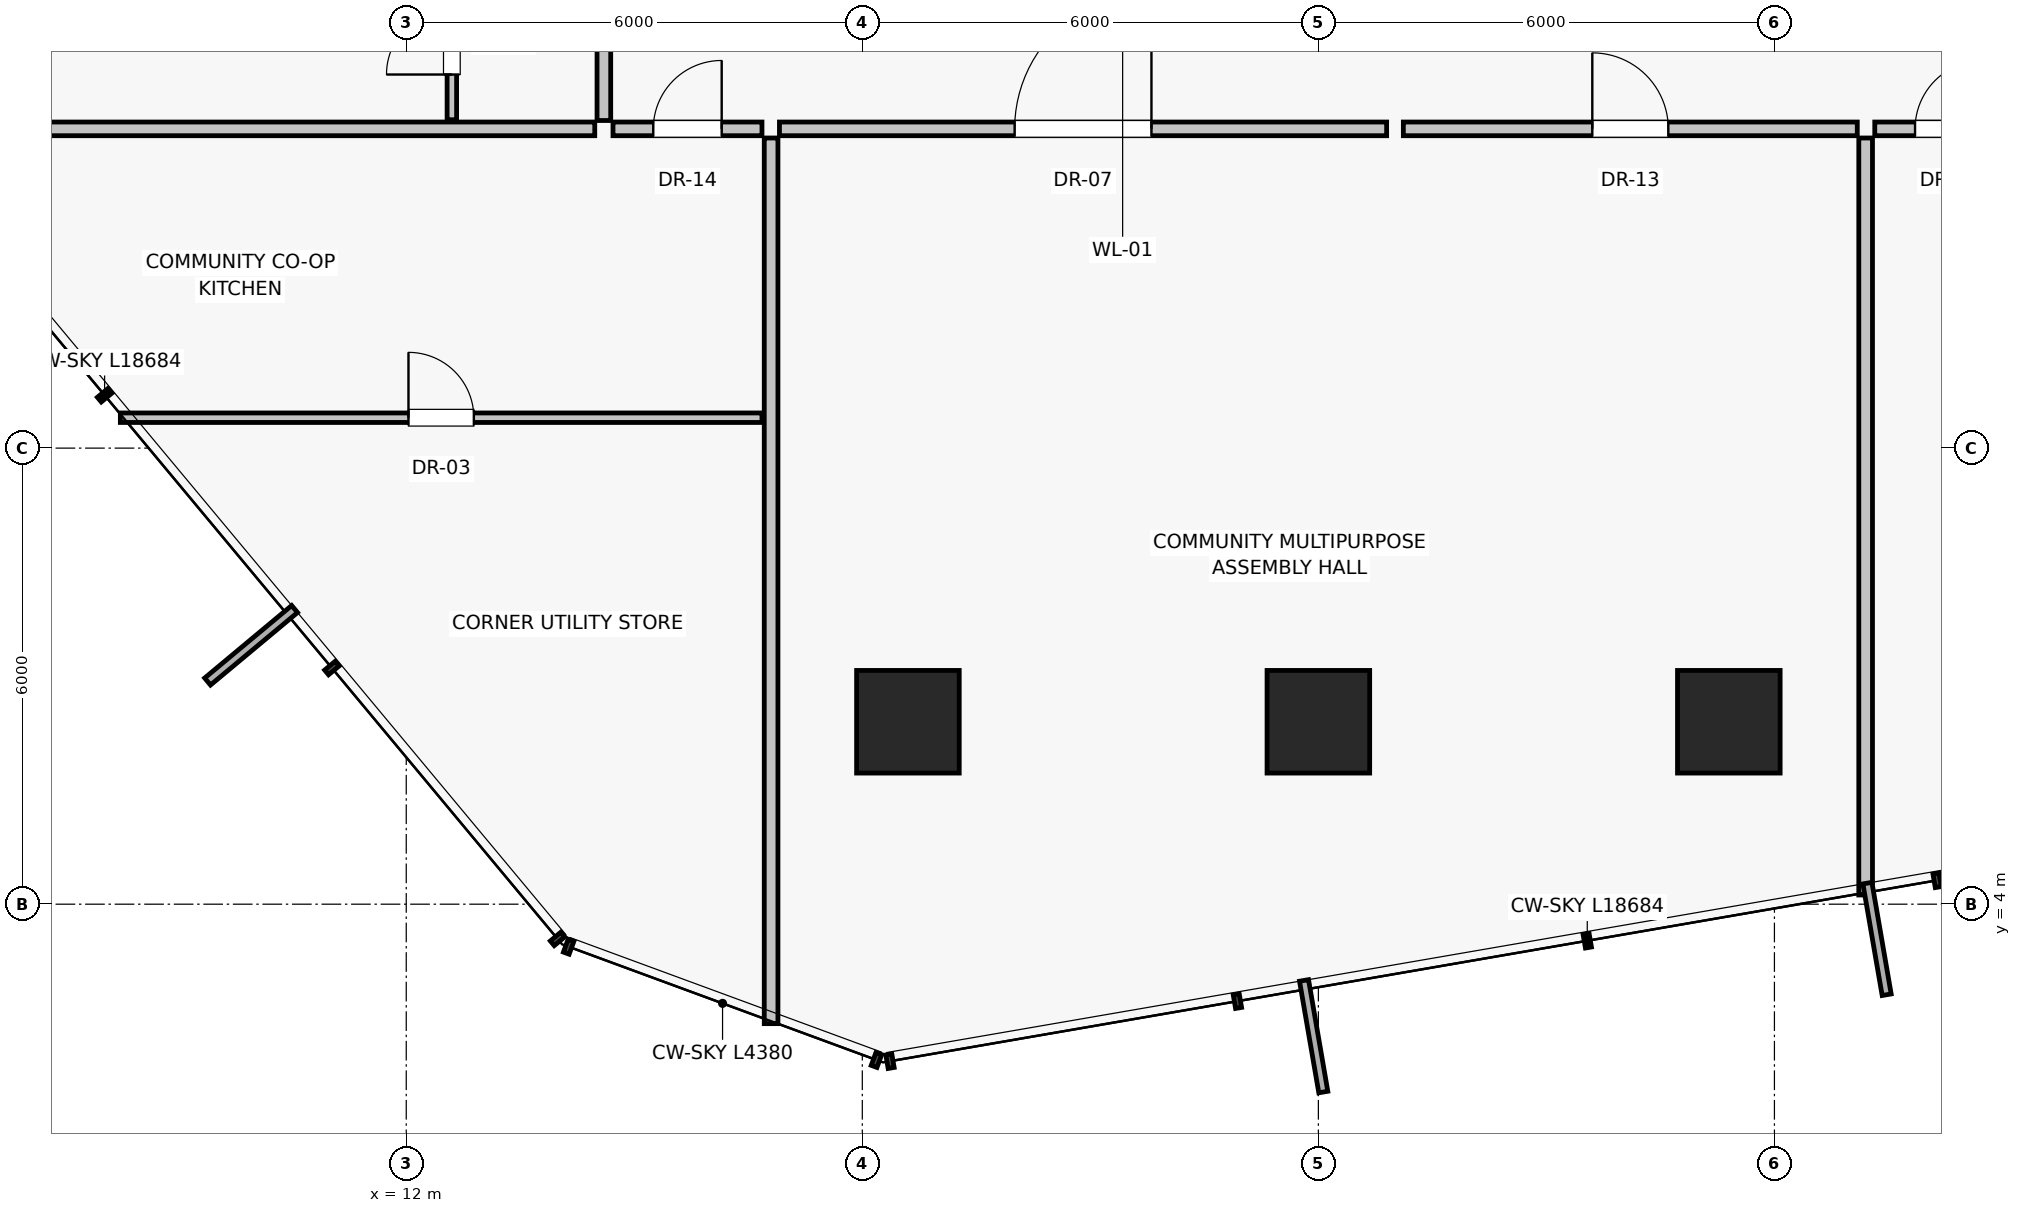
"""IFC4 building model, lengths in metres.
Left out: names, types, materials, properties, quantities, classifications, styles, units other than length and angle.
Written with IfcOpenShell. Run it as: python <this file> out.ifc"""

import sys

from ifc_helpers import new_model, si_unit, direction, frame, frame_2d, origin, origin_2d, place, context, subcontext, project, spatial, rectangle, extrude, source, transform, mapped, element, fill, save


model = new_model("IFC4")
c1 = context("Model", 3, precision=1e-05, world=origin(), true_north=direction((0.0, 1.0)))
c2 = subcontext(c1, "Body", "Model", "MODEL_VIEW")
j1 = project(units=[si_unit("LENGTHUNIT", "METRE"), si_unit("PLANEANGLEUNIT", "RADIAN")], contexts=[c1])
p1 = place(None, origin())
s1 = spatial("IfcSite", under=j1, at=p1, CompositionType="ELEMENT")
p2 = place(p1, origin())
s2 = spatial("IfcBuilding", under=s1, at=p2, CompositionType="ELEMENT")
p3 = place(p2, frame((0.0, 0.0, 56.55)))
s3 = spatial("IfcBuildingStorey", under=s2, at=p3, CompositionType="ELEMENT", Elevation=56.55)
for number, where, z_axis, x_axis in (
    (1, (18.6, 6.4, 0.0), (0.0, 0.0, 1.0), (1.0, 0.0, 0.0)),
    (2, (24.0, 6.4, 0.0), (0.0, 0.0, 1.0), (1.0, 0.0, 0.0)),
    (3, (29.4, 6.4, 0.0), (0.0, 0.0, 1.0), (1.0, 0.0, 0.0)),
):
    element("IfcColumn", number, at=place(p3, frame(where, z_axis=z_axis, x_axis=x_axis)), inside=s3, PredefinedType="COLUMN", context=c2, shape_type="SweptSolid", body=[
        extrude(rectangle(XDim=1.35, YDim=1.35, at=origin_2d()), origin(), (0.0, 0.0, 1.0), 4.3),
    ])
p4 = place(p3, frame((16.8, 14.08, 0.0), z_axis=(0.0, 0.0, 1.0), x_axis=(0.0, -1.0, 0.0)))
e4 = element("IfcWall", 4, at=p4, inside=s3, PredefinedType="PARTITIONING", context=c2, shape_type="SweptSolid", body=[
    extrude(rectangle(XDim=11.652, YDim=0.18, at=frame_2d((5.826, 0.0))), origin(), (0.0, 0.0, 1.0), 4.05),
])
p5 = place(p3, frame((31.2, 14.08, 0.0), z_axis=(0.0, 0.0, 1.0), x_axis=(0.0, -1.0, 0.0)))
e5 = element("IfcWall", 5, at=p5, inside=s3, PredefinedType="PARTITIONING", context=c2, shape_type="SweptSolid", body=[
    extrude(rectangle(XDim=9.959, YDim=0.18, at=frame_2d((4.979, 0.0))), origin(), (0.0, 0.0, 1.0), 4.05),
])
p6 = place(p3, frame((16.91, 14.2, 0.0), z_axis=(0.0, 0.0, 1.0), x_axis=(1.0, 0.0, 0.0)))
e6 = element("IfcWall", 6, at=p6, inside=s3, PredefinedType="PARTITIONING", context=c2, shape_type="SweptSolid", body=[
    extrude(rectangle(XDim=7.988, YDim=0.18, at=frame_2d((3.994, 0.0))), origin(), (0.0, 0.0, 1.0), 4.05),
])
p7 = place(p6, frame((3.094, 0.0, 0.0)))
e7 = element("IfcOpeningElement", 7, at=p7, cuts=e6, PredefinedType="OPENING", context=c2, shape_type="SweptSolid", body=[
    extrude(rectangle(XDim=1.8, YDim=2.25, at=frame_2d((0.9, 1.125))), frame((0.0, 0.1, 0.0), z_axis=(0.0, -1.0, 0.0), x_axis=(1.0, 0.0, 0.0)), (0.0, 0.0, 1.0), 0.2),
])
p8 = place(p3, frame((25.118, 14.2, 0.0), z_axis=(0.0, 0.0, 1.0), x_axis=(1.0, 0.0, 0.0)))
e8 = element("IfcWall", 8, at=p8, inside=s3, PredefinedType="PARTITIONING", context=c2, shape_type="SweptSolid", body=[
    extrude(rectangle(XDim=5.972, YDim=0.18, at=frame_2d((2.986, 0.0))), origin(), (0.0, 0.0, 1.0), 4.05),
])
p9 = place(p8, frame((2.486, 0.0, 0.0)))
e9 = element("IfcOpeningElement", 9, at=p9, cuts=e8, PredefinedType="OPENING", context=c2, shape_type="SweptSolid", body=[
    extrude(rectangle(XDim=1.0, YDim=2.01, at=frame_2d((0.5, 1.005))), frame((0.0, 0.1, 0.0), z_axis=(0.0, -1.0, 0.0), x_axis=(1.0, 0.0, 0.0)), (0.0, 0.0, 1.0), 0.2),
])
p10 = place(p3, frame((14.48, 14.2, 0.0), z_axis=(0.0, 0.0, 1.0), x_axis=(-1.0, 0.0, 0.0)))
e10 = element("IfcWall", 10, at=p10, inside=s3, PredefinedType="PARTITIONING", context=c2, shape_type="SweptSolid", body=[
    extrude(rectangle(XDim=9.407, YDim=0.18, at=frame_2d((4.704, 0.0))), origin(), (0.0, 0.0, 1.0), 4.05),
])
p11 = place(p3, frame((14.6, 14.31, 0.0), z_axis=(0.0, 0.0, 1.0), x_axis=(0.0, 1.0, 0.0)))
e11 = element("IfcWall", 11, at=p11, inside=s3, PredefinedType="PARTITIONING", context=c2, shape_type="SweptSolid", body=[
    extrude(rectangle(XDim=11.032, YDim=0.18, at=frame_2d((5.516, 0.0))), origin(), (0.0, 0.0, 1.0), 4.05),
])
p12 = place(p11, frame((3.635, 0.0, 0.0)))
e12 = element("IfcOpeningElement", 12, at=p12, cuts=e11, PredefinedType="OPENING", context=c2, shape_type="SweptSolid", body=[
    extrude(rectangle(XDim=0.95, YDim=2.02, at=frame_2d((0.475, 1.01))), frame((0.0, 0.1, 0.0), z_axis=(0.0, -1.0, 0.0), x_axis=(1.0, 0.0, 0.0)), (0.0, 0.0, 1.0), 0.2),
])
p13 = place(p3, frame((12.6, 14.32, 0.0), z_axis=(0.0, 0.0, 1.0), x_axis=(0.0, 1.0, 0.0)))
e13 = element("IfcWall", 13, at=p13, inside=s3, PredefinedType="PARTITIONING", context=c2, shape_type="SweptSolid", body=[
    extrude(rectangle(XDim=2.05, YDim=0.125, at=frame_2d((1.025, 0.0))), origin(), (0.0, 0.0, 1.0), 4.05),
])
p14 = place(p13, frame((0.595, 0.0, 0.0)))
e14 = element("IfcOpeningElement", 14, at=p14, cuts=e13, PredefinedType="OPENING", context=c2, shape_type="SweptSolid", body=[
    extrude(rectangle(XDim=0.86, YDim=2.01, at=frame_2d((0.43, 1.005))), frame((0.0, 0.073, 0.0), z_axis=(0.0, -1.0, 0.0), x_axis=(1.0, 0.0, 0.0)), (0.0, 0.0, 1.0), 0.145),
])
p15 = place(p3, frame((14.72, 14.2, 0.0), z_axis=(0.0, 0.0, 1.0), x_axis=(1.0, 0.0, 0.0)))
e15 = element("IfcWall", 15, at=p15, inside=s3, PredefinedType="PARTITIONING", context=c2, shape_type="SweptSolid", body=[
    extrude(rectangle(XDim=1.96, YDim=0.18, at=frame_2d((0.98, 0.0))), origin(), (0.0, 0.0, 1.0), 4.05),
])
p16 = place(p15, frame((0.53, 0.0, 0.0)))
e16 = element("IfcOpeningElement", 16, at=p16, cuts=e15, PredefinedType="OPENING", context=c2, shape_type="SweptSolid", body=[
    extrude(rectangle(XDim=0.9, YDim=2.01, at=frame_2d((0.45, 1.005))), frame((0.0, 0.1, 0.0), z_axis=(0.0, -1.0, 0.0), x_axis=(1.0, 0.0, 0.0)), (0.0, 0.0, 1.0), 0.2),
])
p17 = place(p3, frame((8.239, 10.4, 0.0), z_axis=(0.0, 0.0, 1.0), x_axis=(1.0, 0.0, 0.0)))
e17 = element("IfcWall", 17, at=p17, inside=s3, PredefinedType="PARTITIONING", context=c2, shape_type="SweptSolid", body=[
    extrude(rectangle(XDim=8.441, YDim=0.125, at=frame_2d((4.221, 0.0))), origin(), (0.0, 0.0, 1.0), 4.05),
])
p18 = place(p17, frame((3.791, 0.0, 0.0)))
e18 = element("IfcOpeningElement", 18, at=p18, cuts=e17, PredefinedType="OPENING", context=c2, shape_type="SweptSolid", body=[
    extrude(rectangle(XDim=0.86, YDim=2.01, at=frame_2d((0.43, 1.005))), frame((0.0, 0.073, 0.0), z_axis=(0.0, -1.0, 0.0), x_axis=(1.0, 0.0, 0.0)), (0.0, 0.0, 1.0), 0.145),
])
p19 = place(p3, frame((31.32, 14.2, 0.0), z_axis=(0.0, 0.0, 1.0), x_axis=(1.0, 0.0, 0.0)))
e19 = element("IfcWall", 19, at=p19, inside=s3, PredefinedType="PARTITIONING", context=c2, shape_type="SweptSolid", body=[
    extrude(rectangle(XDim=1.96, YDim=0.18, at=frame_2d((0.98, 0.0))), origin(), (0.0, 0.0, 1.0), 4.05),
])
p20 = place(p19, frame((0.53, 0.0, 0.0)))
e20 = element("IfcOpeningElement", 20, at=p20, cuts=e19, PredefinedType="OPENING", context=c2, shape_type="SweptSolid", body=[
    extrude(rectangle(XDim=0.9, YDim=2.01, at=frame_2d((0.45, 1.005))), frame((0.0, 0.1, 0.0), z_axis=(0.0, -1.0, 0.0), x_axis=(1.0, 0.0, 0.0)), (0.0, 0.0, 1.0), 0.2),
])
m1 = source(origin(), c2, "Body", "SweptSolid", [
    extrude(rectangle(XDim=1.8, YDim=2.25, at=frame_2d((0.9, 1.125))), frame((0.0, 0.025, 0.0), z_axis=(0.0, -1.0, 0.0), x_axis=(1.0, 0.0, 0.0)), (0.0, 0.0, 1.0), 0.05),
])
p21 = place(p7, origin())
e21 = element("IfcDoor", 21, at=p21, inside=s3, OperationType="SINGLE_SWING_RIGHT", PredefinedType="DOOR", context=c2, shape_type="MappedRepresentation", body=[
    mapped(m1, transform((0.0, 0.0, 0.0), scale=1.0)),
])
fill(e7, e21)
m2 = source(origin(), c2, "Body", "SweptSolid", [
    extrude(rectangle(XDim=1.0, YDim=2.01, at=frame_2d((0.5, 1.005))), frame((0.0, 0.025, 0.0), z_axis=(0.0, -1.0, 0.0), x_axis=(1.0, 0.0, 0.0)), (0.0, 0.0, 1.0), 0.05),
])
p22 = place(p9, origin())
e22 = element("IfcDoor", 22, at=p22, inside=s3, OperationType="SINGLE_SWING_LEFT", PredefinedType="DOOR", context=c2, shape_type="MappedRepresentation", body=[
    mapped(m2, transform((0.0, 0.0, 0.0), scale=1.0)),
])
fill(e9, e22)
m3 = source(origin(), c2, "Body", "SweptSolid", [
    extrude(rectangle(XDim=0.86, YDim=2.01, at=frame_2d((0.43, 1.005))), frame((0.0, 0.025, 0.0), z_axis=(0.0, -1.0, 0.0), x_axis=(1.0, 0.0, 0.0)), (0.0, 0.0, 1.0), 0.05),
])
p23 = place(p14, origin())
e23 = element("IfcDoor", 23, at=p23, inside=s3, OperationType="SINGLE_SWING_LEFT", PredefinedType="DOOR", context=c2, shape_type="MappedRepresentation", body=[
    mapped(m3, transform((0.0, 0.0, 0.0), scale=1.0)),
])
fill(e14, e23)
m4 = source(origin(), c2, "Body", "SweptSolid", [
    extrude(rectangle(XDim=0.9, YDim=2.01, at=frame_2d((0.45, 1.005))), frame((0.0, 0.025, 0.0), z_axis=(0.0, -1.0, 0.0), x_axis=(1.0, 0.0, 0.0)), (0.0, 0.0, 1.0), 0.05),
])
p24 = place(p16, origin())
e24 = element("IfcDoor", 24, at=p24, inside=s3, OperationType="SINGLE_SWING_RIGHT", PredefinedType="DOOR", context=c2, shape_type="MappedRepresentation", body=[
    mapped(m4, transform((0.0, 0.0, 0.0), scale=1.0)),
])
fill(e16, e24)
p25 = place(p18, origin())
e25 = element("IfcDoor", 25, at=p25, inside=s3, OperationType="SINGLE_SWING_LEFT", PredefinedType="DOOR", context=c2, shape_type="MappedRepresentation", body=[
    mapped(m3, transform((0.0, 0.0, 0.0), scale=1.0)),
])
fill(e18, e25)
p26 = place(p20, origin())
e26 = element("IfcDoor", 26, at=p26, inside=s3, OperationType="SINGLE_SWING_RIGHT", PredefinedType="DOOR", context=c2, shape_type="MappedRepresentation", body=[
    mapped(m4, transform((0.0, 0.0, 0.0), scale=1.0)),
])
fill(e20, e26)
save(model, sys.argv[1])
